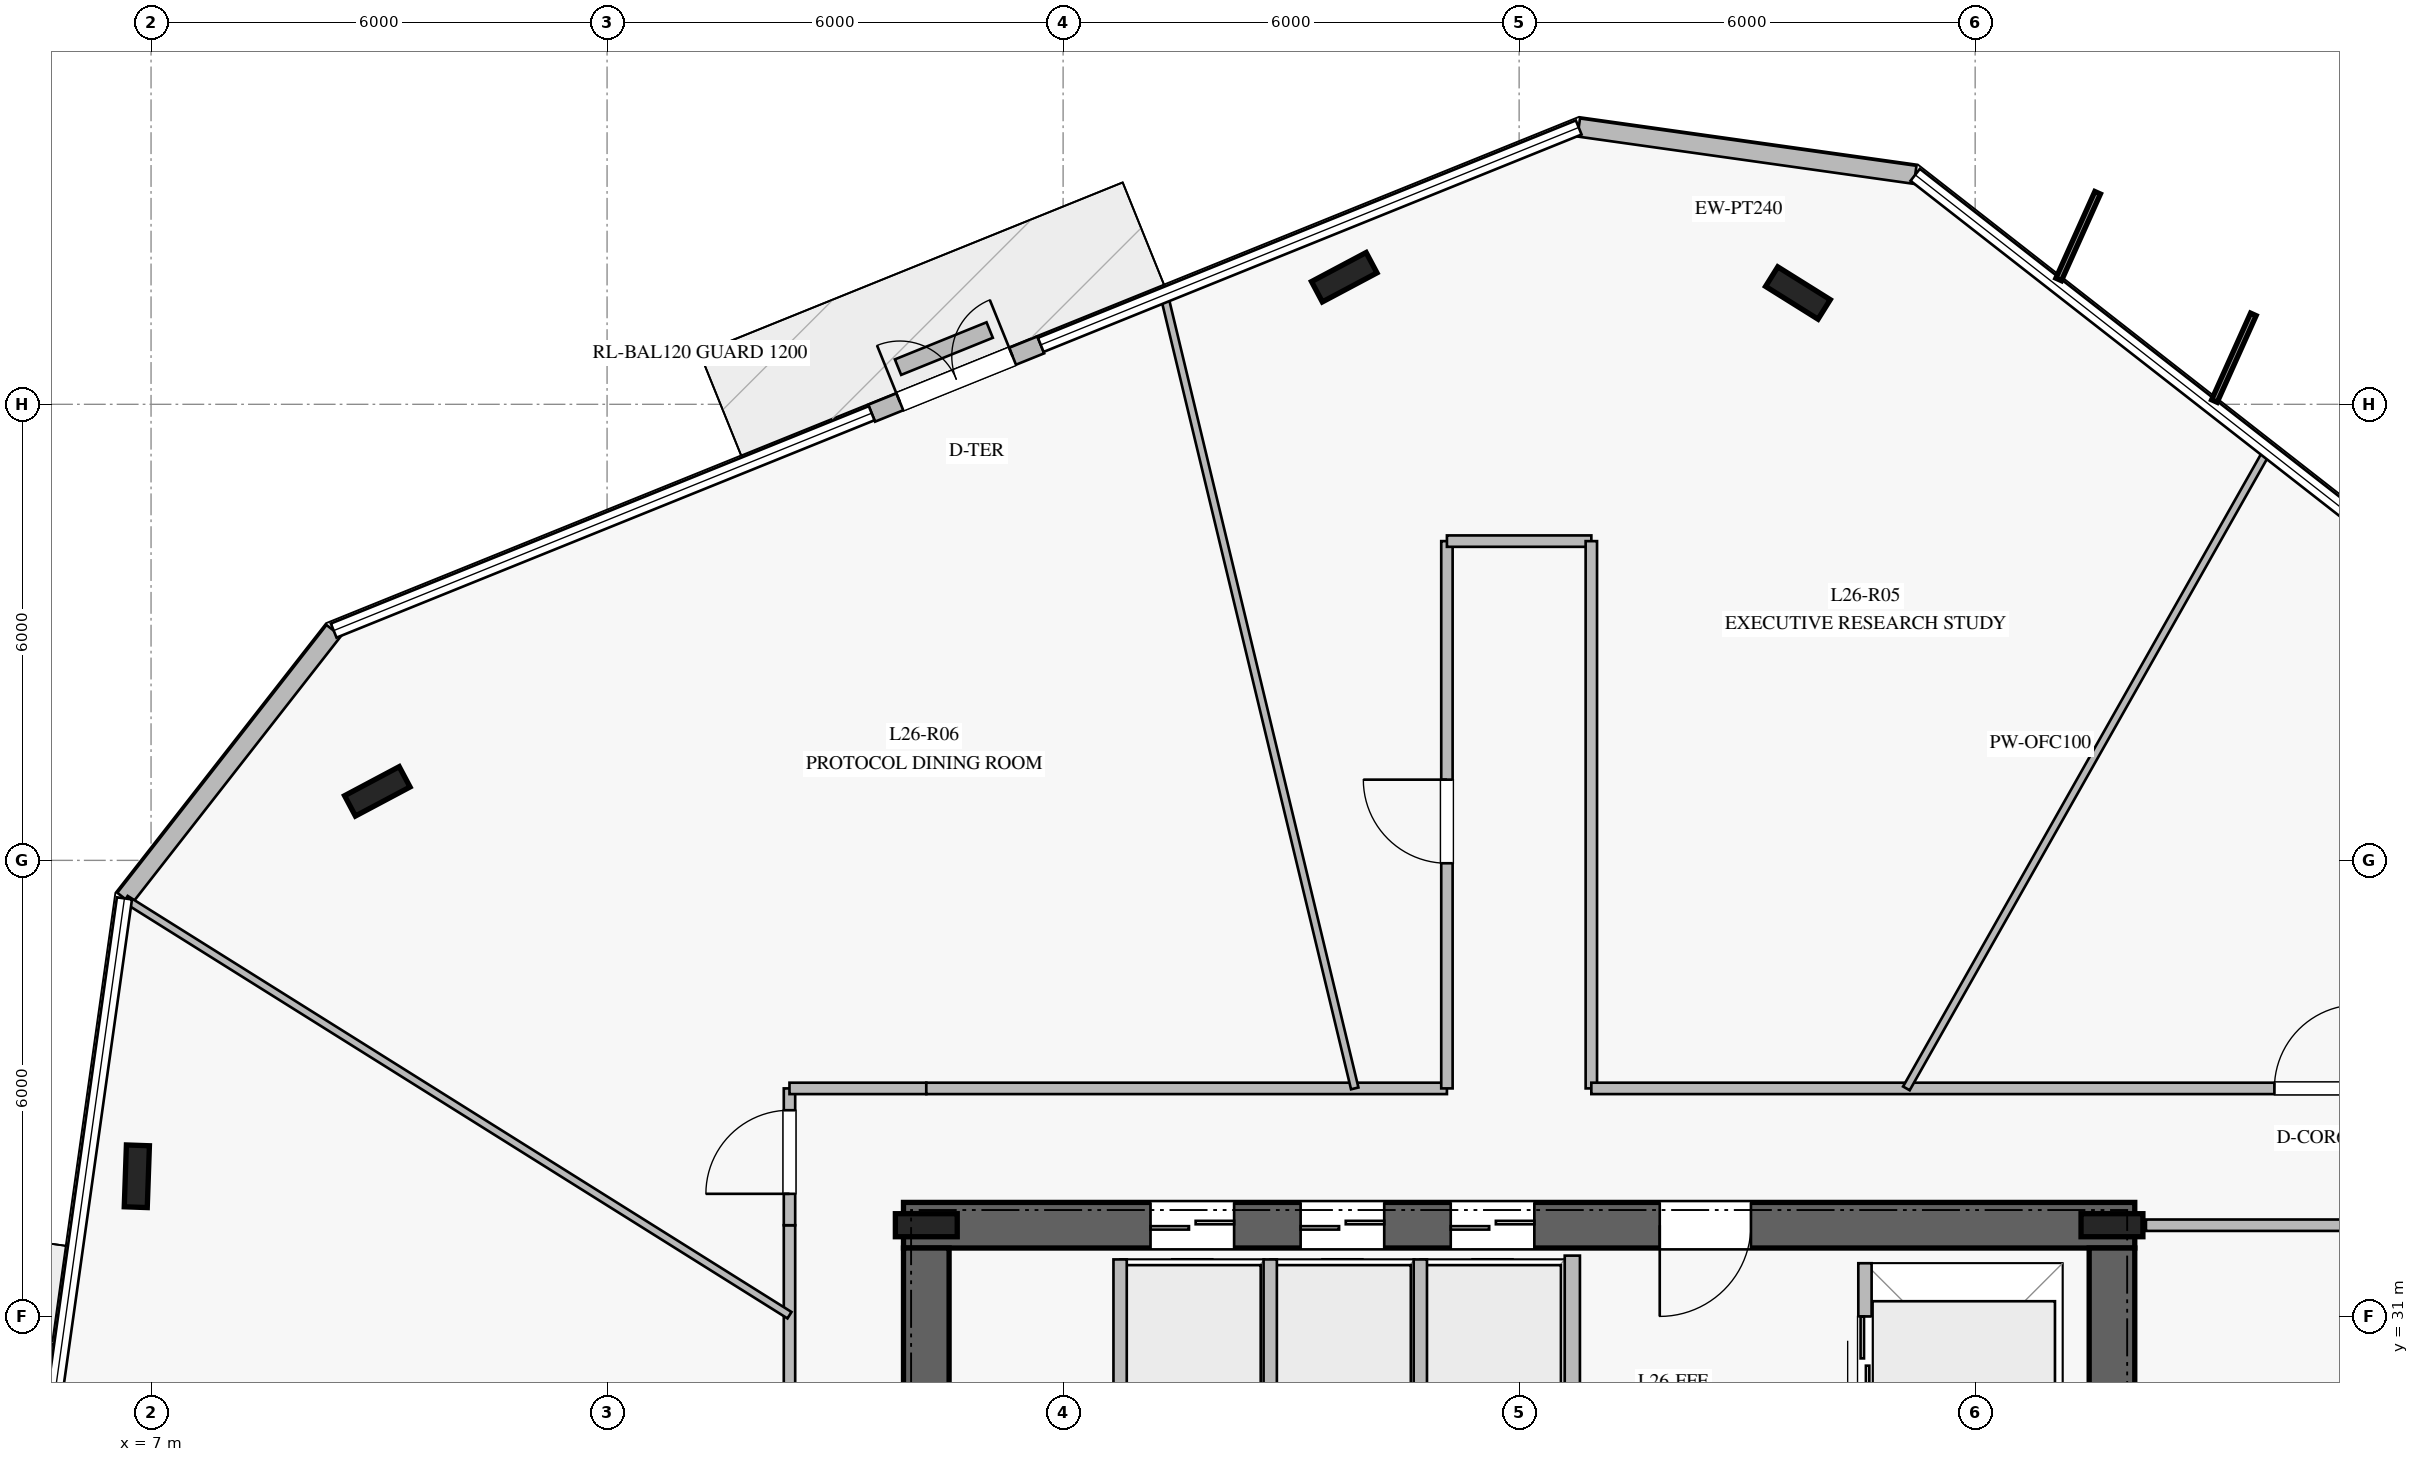
"""IFC4 building model, lengths in metres.
Left out: names, types, materials, properties, quantities, classifications, styles, units other than length and angle.
Written with IfcOpenShell. Run it as: python <this file> out.ifc"""

import sys

from ifc_helpers import new_model, si_unit, direction, frame, frame_2d, origin, origin_2d, place, context, subcontext, project, spatial, rectangle, i_section, extrude, element, fill, save


model = new_model("IFC4")
c1 = context("Model", 3, precision=1e-05, world=origin(), true_north=direction((0.0, 1.0)))
c2 = subcontext(c1, "Body", "Model", "MODEL_VIEW")
j1 = project(units=[si_unit("LENGTHUNIT", "METRE"), si_unit("PLANEANGLEUNIT", "RADIAN")], contexts=[c1])
p1 = place(None, origin())
s1 = spatial("IfcSite", under=j1, at=p1, CompositionType="ELEMENT")
p2 = place(p1, origin())
s2 = spatial("IfcBuilding", under=s1, at=p2, CompositionType="ELEMENT")
p3 = place(p2, frame((0.0, 0.0, 110.4)))
s3 = spatial("IfcBuildingStorey", under=s2, at=p3, CompositionType="ELEMENT", Elevation=110.4)
p4 = place(p3, frame((33.1, 32.2, 0.0), z_axis=(0.0, 0.0, 1.0), x_axis=(-1.0, 0.0, 0.0)))
e1 = element("IfcWall", 1, at=p4, inside=s3, PredefinedType="SHEAR", context=c2, shape_type="SweptSolid", body=[
    extrude(rectangle(XDim=16.2, YDim=0.6, at=frame_2d((8.1, 0.0))), origin(), (0.0, 0.0, 1.0), 3.76),
])
p5 = place(p4, frame((5.05, 0.0, 0.0)))
e2 = element("IfcOpeningElement", 2, at=p5, cuts=e1, PredefinedType="OPENING", context=c2, shape_type="SweptSolid", body=[
    extrude(rectangle(XDim=1.2, YDim=2.25, at=frame_2d((0.6, 1.125))), frame((0.0, 0.31, 0.0), z_axis=(0.0, -1.0, 0.0), x_axis=(1.0, 0.0, 0.0)), (0.0, 0.0, 1.0), 0.62),
])
p6 = place(p4, frame((11.85, 0.0, 0.0)))
e3 = element("IfcOpeningElement", 3, at=p6, cuts=e1, PredefinedType="OPENING", context=c2, shape_type="SweptSolid", body=[
    extrude(rectangle(XDim=1.1, YDim=2.2, at=frame_2d((0.55, 1.1))), frame((0.0, 0.31, 0.0), z_axis=(0.0, -1.0, 0.0), x_axis=(1.0, 0.0, 0.0)), (0.0, 0.0, 1.0), 0.62),
])
p7 = place(p4, frame((9.875, 0.0, 0.0)))
e4 = element("IfcOpeningElement", 4, at=p7, cuts=e1, PredefinedType="OPENING", context=c2, shape_type="SweptSolid", body=[
    extrude(rectangle(XDim=1.1, YDim=2.2, at=frame_2d((0.55, 1.1))), frame((0.0, 0.31, 0.0), z_axis=(0.0, -1.0, 0.0), x_axis=(1.0, 0.0, 0.0)), (0.0, 0.0, 1.0), 0.62),
])
p8 = place(p4, frame((7.9, 0.0, 0.0)))
e5 = element("IfcOpeningElement", 5, at=p8, cuts=e1, PredefinedType="OPENING", context=c2, shape_type="SweptSolid", body=[
    extrude(rectangle(XDim=1.1, YDim=2.2, at=frame_2d((0.55, 1.1))), frame((0.0, 0.31, 0.0), z_axis=(0.0, -1.0, 0.0), x_axis=(1.0, 0.0, 0.0)), (0.0, 0.0, 1.0), 0.62),
])
p9 = place(p3, frame((17.2, 31.9, 0.0), z_axis=(0.0, 0.0, 1.0), x_axis=(0.0, -1.0, 0.0)))
e6 = element("IfcWall", 6, at=p9, inside=s3, PredefinedType="SHEAR", context=c2, shape_type="SweptSolid", body=[
    extrude(rectangle(XDim=13.8, YDim=0.6, at=frame_2d((6.9, 0.0))), origin(), (0.0, 0.0, 1.0), 3.76),
])
p10 = place(p9, frame((2.05, 0.0, 0.0)))
e7 = element("IfcOpeningElement", 7, at=p10, cuts=e6, PredefinedType="OPENING", context=c2, shape_type="SweptSolid", body=[
    extrude(rectangle(XDim=1.5, YDim=2.2, at=frame_2d((0.75, 1.1))), frame((0.0, 0.31, 0.0), z_axis=(0.0, -1.0, 0.0), x_axis=(1.0, 0.0, 0.0)), (0.0, 0.0, 1.0), 0.62),
])
p11 = place(p3, frame((32.8, 18.1, 0.0), z_axis=(0.0, 0.0, 1.0), x_axis=(0.0, 1.0, 0.0)))
e8 = element("IfcWall", 8, at=p11, inside=s3, PredefinedType="SHEAR", context=c2, shape_type="SweptSolid", body=[
    extrude(rectangle(XDim=13.8, YDim=0.6, at=frame_2d((6.9, 0.0))), origin(), (0.0, 0.0, 1.0), 3.76),
])
for number, where, z_axis, x_axis in (
    (9, (32.8, 32.2, 0.0), (0.0, 0.0, 1.0), (1.0, 0.0, 0.0)),
    (10, (17.2, 32.2, 0.0), (0.0, 0.0, 1.0), (1.0, 0.0, 0.0)),
    (11, (28.668, 44.464, 0.0), (0.0, 0.0, 1.0), (-0.848, 0.53, 0.0)),
    (12, (22.699, 44.672, 0.0), (0.0, 0.0, 1.0), (0.883, 0.469, 0.0)),
    (13, (9.977, 37.908, 0.0), (0.0, 0.0, 1.0), (0.883, 0.469, 0.0)),
    (14, (6.813, 32.844, 0.0), (0.0, 0.0, 1.0), (0.035, 0.999, 0.0)),
):
    element("IfcColumn", number, at=place(p3, frame(where, z_axis=z_axis, x_axis=x_axis)), inside=s3, PredefinedType="COLUMN", context=c2, shape_type="SweptSolid", body=[
        extrude(i_section(OverallWidth=0.303, OverallDepth=0.814, WebThickness=0.021, FlangeThickness=0.04, at=origin_2d()), origin(), (0.0, 0.0, 1.0), 4.0),
    ])
p12 = place(p3, frame((30.211, 46.019, 0.0), z_axis=(0.0, 0.0, 1.0), x_axis=(-0.990241158584, 0.139364442547, 0.0)))
e15 = element("IfcWall", 15, at=p12, inside=s3, PredefinedType="STANDARD", context=c2, shape_type="SweptSolid", body=[
    extrude(rectangle(XDim=4.471, YDim=0.24, at=frame_2d((2.235, 0.0))), origin(), (0.0, 0.0, 1.0), 3.76),
])
p13 = place(p3, frame((18.706, 43.782, 0.0), z_axis=(0.0, 0.0, 1.0), x_axis=(-0.927194278769, -0.374580791576, 0.0)))
e16 = element("IfcWall", 16, at=p13, inside=s3, PredefinedType="STANDARD", context=c2, shape_type="SweptSolid", body=[
    extrude(rectangle(XDim=2.4, YDim=0.24, at=frame_2d((1.2, 0.0))), origin(), (0.0, 0.0, 1.0), 3.76),
])
p14 = place(p13, frame((0.4, 0.0, 0.0)))
e17 = element("IfcOpeningElement", 17, at=p14, cuts=e16, PredefinedType="OPENING", context=c2, shape_type="SweptSolid", body=[
    extrude(rectangle(XDim=1.6, YDim=2.25, at=frame_2d((0.8, 1.125))), frame((0.0, 0.13, 0.0), z_axis=(0.0, -1.0, 0.0), x_axis=(1.0, 0.0, 0.0)), (0.0, 0.0, 1.0), 0.26),
])
p15 = place(p3, frame((9.403, 40.023, 0.0), z_axis=(0.0, 0.0, 1.0), x_axis=(-0.615764831552, -0.787929991956, 0.0)))
e18 = element("IfcWall", 18, at=p15, inside=s3, PredefinedType="STANDARD", context=c2, shape_type="SweptSolid", body=[
    extrude(rectangle(XDim=4.471, YDim=0.24, at=frame_2d((2.236, 0.0))), origin(), (0.0, 0.0, 1.0), 3.76),
])
p16 = place(p3, frame((18.034, 43.977, 0.0), z_axis=(0.0, 0.0, 1.0), x_axis=(-0.926980993663, -0.375108300877, 0.0)))
e19 = element("IfcWall", 19, at=p16, inside=s3, PredefinedType="USERDEFINED", context=c2, shape_type="SweptSolid", body=[
    extrude(rectangle(XDim=1.301, YDim=0.22, at=frame_2d((0.65, 0.0))), origin(), (0.0, 0.0, 1.0), 0.4),
])
p17 = place(p3, frame((25.7, 26.65, 0.0), z_axis=(0.0, 0.0, 1.0), x_axis=(0.0, 1.0, 0.0)))
e20 = element("IfcWall", 20, at=p17, inside=s3, PredefinedType="PARTITIONING", context=c2, shape_type="SweptSolid", body=[
    extrude(rectangle(XDim=5.15, YDim=0.2, at=frame_2d((2.575, 0.0))), origin(), (0.0, 0.0, 1.0), 3.76),
])
for number, where, z_axis, x_axis in (
    (21, (19.75, 29.4, 0.0), (0.0, 0.0, 1.0), (0.0, 1.0, 0.0)),
    (22, (21.725, 29.4, 0.0), (0.0, 0.0, 1.0), (0.0, 1.0, 0.0)),
    (23, (23.7, 29.4, 0.0), (0.0, 0.0, 1.0), (0.0, 1.0, 0.0)),
):
    element("IfcWall", number, at=place(p3, frame(where, z_axis=z_axis, x_axis=x_axis)), inside=s3, PredefinedType="PARTITIONING", context=c2, shape_type="SweptSolid", body=[
        extrude(rectangle(XDim=2.35, YDim=0.175, at=frame_2d((1.175, 0.0))), origin(), (0.0, 0.0, 1.0), 3.76),
    ])
p18 = place(p3, frame((29.55, 29.1, 0.0), z_axis=(0.0, 0.0, 1.0), x_axis=(0.0, 1.0, 0.0)))
e24 = element("IfcWall", 24, at=p18, inside=s3, PredefinedType="PARTITIONING", context=c2, shape_type="SweptSolid", body=[
    extrude(rectangle(XDim=2.6, YDim=0.175, at=frame_2d((1.3, 0.0))), origin(), (0.0, 0.0, 1.0), 3.76),
])
p19 = place(p18, frame((0.7, 0.0, 0.0)))
e25 = element("IfcOpeningElement", 25, at=p19, cuts=e24, PredefinedType="OPENING", context=c2, shape_type="SweptSolid", body=[
    extrude(rectangle(XDim=1.2, YDim=2.2, at=frame_2d((0.6, 1.1))), frame((0.0, 0.098, 0.0), z_axis=(0.0, -1.0, 0.0), x_axis=(1.0, 0.0, 0.0)), (0.0, 0.0, 1.0), 0.195),
])
p20 = place(p3, frame((15.4, 25.95, 0.0), z_axis=(0.0, 0.0, 1.0), x_axis=(0.0, 1.0, 0.0)))
e26 = element("IfcWall", 26, at=p20, inside=s3, PredefinedType="PARTITIONING", context=c2, shape_type="SweptSolid", body=[
    extrude(rectangle(XDim=6.25, YDim=0.15, at=frame_2d((3.125, 0.0))), origin(), (0.0, 0.0, 1.0), 3.21),
])
p21 = place(p3, frame((15.4, 32.2, 0.0), z_axis=(0.0, 0.0, 1.0), x_axis=(0.0, 1.0, 0.0)))
e27 = element("IfcWall", 27, at=p21, inside=s3, PredefinedType="PARTITIONING", context=c2, shape_type="SweptSolid", body=[
    extrude(rectangle(XDim=1.8, YDim=0.15, at=frame_2d((0.9, 0.0))), origin(), (0.0, 0.0, 1.0), 3.21),
])
p22 = place(p21, frame((0.413, 0.0, 0.0)))
e28 = element("IfcOpeningElement", 28, at=p22, cuts=e27, PredefinedType="OPENING", context=c2, shape_type="SweptSolid", body=[
    extrude(rectangle(XDim=1.1, YDim=2.2, at=frame_2d((0.55, 1.1))), frame((0.0, 0.085, 0.0), z_axis=(0.0, -1.0, 0.0), x_axis=(1.0, 0.0, 0.0)), (0.0, 0.0, 1.0), 0.17),
])
p23 = place(p3, frame((15.4, 34.0, 0.0), z_axis=(0.0, 0.0, 1.0), x_axis=(1.0, 0.0, 0.0)))
e29 = element("IfcWall", 29, at=p23, inside=s3, PredefinedType="PARTITIONING", context=c2, shape_type="SweptSolid", body=[
    extrude(rectangle(XDim=1.8, YDim=0.15, at=frame_2d((0.9, 0.0))), origin(), (0.0, 0.0, 1.0), 3.76),
])
p24 = place(p3, frame((17.2, 34.0, 0.0), z_axis=(0.0, 0.0, 1.0), x_axis=(1.0, 0.0, 0.0)))
e30 = element("IfcWall", 30, at=p24, inside=s3, PredefinedType="PARTITIONING", context=c2, shape_type="SweptSolid", body=[
    extrude(rectangle(XDim=6.85, YDim=0.15, at=frame_2d((3.425, 0.0))), origin(), (0.0, 0.0, 1.0), 3.21),
])
p25 = place(p3, frame((24.05, 34.0, 0.0), z_axis=(0.0, 0.0, 1.0), x_axis=(0.0, 1.0, 0.0)))
e31 = element("IfcWall", 31, at=p25, inside=s3, PredefinedType="PARTITIONING", context=c2, shape_type="SweptSolid", body=[
    extrude(rectangle(XDim=7.2, YDim=0.15, at=frame_2d((3.6, 0.0))), origin(), (0.0, 0.0, 1.0), 3.36),
])
p26 = place(p25, frame((2.962, 0.0, 0.0)))
e32 = element("IfcOpeningElement", 32, at=p26, cuts=e31, PredefinedType="OPENING", context=c2, shape_type="SweptSolid", body=[
    extrude(rectangle(XDim=1.1, YDim=2.2, at=frame_2d((0.55, 1.1))), frame((0.0, 0.085, 0.0), z_axis=(0.0, -1.0, 0.0), x_axis=(1.0, 0.0, 0.0)), (0.0, 0.0, 1.0), 0.17),
])
p27 = place(p3, frame((24.05, 41.2, 0.0), z_axis=(0.0, 0.0, 1.0), x_axis=(1.0, 0.0, 0.0)))
e33 = element("IfcWall", 33, at=p27, inside=s3, PredefinedType="PARTITIONING", context=c2, shape_type="SweptSolid", body=[
    extrude(rectangle(XDim=1.9, YDim=0.15, at=frame_2d((0.95, 0.0))), origin(), (0.0, 0.0, 1.0), 3.76),
])
p28 = place(p3, frame((25.95, 41.2, 0.0), z_axis=(0.0, 0.0, 1.0), x_axis=(0.0, -1.0, 0.0)))
e34 = element("IfcWall", 34, at=p28, inside=s3, PredefinedType="PARTITIONING", context=c2, shape_type="SweptSolid", body=[
    extrude(rectangle(XDim=7.2, YDim=0.15, at=frame_2d((3.6, 0.0))), origin(), (0.0, 0.0, 1.0), 3.36),
])
p29 = place(p3, frame((25.95, 34.0, 0.0), z_axis=(0.0, 0.0, 1.0), x_axis=(1.0, 0.0, 0.0)))
e35 = element("IfcWall", 35, at=p29, inside=s3, PredefinedType="PARTITIONING", context=c2, shape_type="SweptSolid", body=[
    extrude(rectangle(XDim=15.25, YDim=0.15, at=frame_2d((7.625, 0.0))), origin(), (0.0, 0.0, 1.0), 3.21),
])
p30 = place(p29, frame((8.987, 0.0, 0.0)))
e36 = element("IfcOpeningElement", 36, at=p30, cuts=e35, PredefinedType="OPENING", context=c2, shape_type="SweptSolid", body=[
    extrude(rectangle(XDim=1.1, YDim=2.2, at=frame_2d((0.55, 1.1))), frame((0.0, 0.085, 0.0), z_axis=(0.0, -1.0, 0.0), x_axis=(1.0, 0.0, 0.0)), (0.0, 0.0, 1.0), 0.17),
])
p31 = place(p3, frame((41.2, 32.2, 0.0), z_axis=(0.0, 0.0, 1.0), x_axis=(-1.0, 0.0, 0.0)))
e37 = element("IfcWall", 37, at=p31, inside=s3, PredefinedType="PARTITIONING", context=c2, shape_type="SweptSolid", body=[
    extrude(rectangle(XDim=7.953, YDim=0.15, at=frame_2d((3.977, 0.0))), origin(), (0.0, 0.0, 1.0), 3.21),
])
p32 = place(p3, frame((30.095, 34.0, 0.0), z_axis=(0.0, 0.0, 1.0), x_axis=(0.492564171428, 0.870276126885, 0.0)))
e38 = element("IfcWall", 38, at=p32, inside=s3, PredefinedType="MOVABLE", context=c2, shape_type="SweptSolid", body=[
    extrude(rectangle(XDim=9.632, YDim=0.1, at=frame_2d((4.816, 0.0))), origin(), (0.0, 0.0, 1.0), 3.16),
])
p33 = place(p3, frame((22.837, 34.0, 0.0), z_axis=(0.0, 0.0, 1.0), x_axis=(-0.233627966114, 0.97232606334, 0.0)))
e39 = element("IfcWall", 39, at=p33, inside=s3, PredefinedType="MOVABLE", context=c2, shape_type="SweptSolid", body=[
    extrude(rectangle(XDim=10.718, YDim=0.1, at=frame_2d((5.359, 0.0))), origin(), (0.0, 0.0, 1.0), 3.16),
])
p34 = place(p3, frame((15.4, 31.016, 0.0), z_axis=(0.0, 0.0, 1.0), x_axis=(-0.847334971685, 0.531058796896, 0.0)))
e40 = element("IfcWall", 40, at=p34, inside=s3, PredefinedType="MOVABLE", context=c2, shape_type="SweptSolid", body=[
    extrude(rectangle(XDim=10.307, YDim=0.1, at=frame_2d((5.154, 0.0))), origin(), (0.0, 0.0, 1.0), 3.16),
])
p35 = place(p14, frame((1.6, 0.0, 0.0), z_axis=(0.0, 0.0, 1.0), x_axis=(-1.0, 0.0, 0.0)))
e41 = element("IfcDoor", 41, at=p35, inside=s3, OperationType="DOUBLE_DOOR_SINGLE_SWING", PredefinedType="DOOR", context=c2, shape_type="SweptSolid", body=[
    extrude(rectangle(XDim=1.6, YDim=2.25, at=frame_2d((0.8, 1.125))), frame((0.0, 0.025, 0.0), z_axis=(0.0, -1.0, 0.0), x_axis=(1.0, 0.0, 0.0)), (0.0, 0.0, 1.0), 0.05),
])
fill(e17, e41)
p36 = place(p5, origin())
e42 = element("IfcDoor", 42, at=p36, inside=s3, OperationType="SINGLE_SWING_RIGHT", PredefinedType="DOOR", context=c2, shape_type="SweptSolid", body=[
    extrude(rectangle(XDim=1.2, YDim=2.25, at=frame_2d((0.6, 1.125))), frame((0.0, 0.025, 0.0), z_axis=(0.0, -1.0, 0.0), x_axis=(1.0, 0.0, 0.0)), (0.0, 0.0, 1.0), 0.05),
])
fill(e2, e42)
p37 = place(p6, origin())
e43 = element("IfcDoor", 43, at=p37, inside=s3, OperationType="DOUBLE_DOOR_SLIDING", PredefinedType="DOOR", context=c2, shape_type="SweptSolid", body=[
    extrude(rectangle(XDim=1.1, YDim=2.2, at=frame_2d((0.55, 1.1))), frame((0.0, 0.025, 0.0), z_axis=(0.0, -1.0, 0.0), x_axis=(1.0, 0.0, 0.0)), (0.0, 0.0, 1.0), 0.05),
])
fill(e3, e43)
p38 = place(p7, origin())
e44 = element("IfcDoor", 44, at=p38, inside=s3, OperationType="DOUBLE_DOOR_SLIDING", PredefinedType="DOOR", context=c2, shape_type="SweptSolid", body=[
    extrude(rectangle(XDim=1.1, YDim=2.2, at=frame_2d((0.55, 1.1))), frame((0.0, 0.025, 0.0), z_axis=(0.0, -1.0, 0.0), x_axis=(1.0, 0.0, 0.0)), (0.0, 0.0, 1.0), 0.05),
])
fill(e4, e44)
p39 = place(p8, origin())
e45 = element("IfcDoor", 45, at=p39, inside=s3, OperationType="DOUBLE_DOOR_SLIDING", PredefinedType="DOOR", context=c2, shape_type="SweptSolid", body=[
    extrude(rectangle(XDim=1.1, YDim=2.2, at=frame_2d((0.55, 1.1))), frame((0.0, 0.025, 0.0), z_axis=(0.0, -1.0, 0.0), x_axis=(1.0, 0.0, 0.0)), (0.0, 0.0, 1.0), 0.05),
])
fill(e5, e45)
p40 = place(p19, origin())
e46 = element("IfcDoor", 46, at=p40, inside=s3, OperationType="DOUBLE_DOOR_SLIDING", PredefinedType="DOOR", context=c2, shape_type="SweptSolid", body=[
    extrude(rectangle(XDim=1.2, YDim=2.2, at=frame_2d((0.6, 1.1))), frame((0.0, 0.025, 0.0), z_axis=(0.0, -1.0, 0.0), x_axis=(1.0, 0.0, 0.0)), (0.0, 0.0, 1.0), 0.05),
])
fill(e25, e46)
p41 = place(p30, origin())
e47 = element("IfcDoor", 47, at=p41, inside=s3, OperationType="SINGLE_SWING_RIGHT", PredefinedType="DOOR", context=c2, shape_type="SweptSolid", body=[
    extrude(rectangle(XDim=1.1, YDim=2.2, at=frame_2d((0.55, 1.1))), frame((0.0, 0.025, 0.0), z_axis=(0.0, -1.0, 0.0), x_axis=(1.0, 0.0, 0.0)), (0.0, 0.0, 1.0), 0.05),
])
fill(e36, e47)
p42 = place(p26, origin())
e48 = element("IfcDoor", 48, at=p42, inside=s3, OperationType="SINGLE_SWING_RIGHT", PredefinedType="DOOR", context=c2, shape_type="SweptSolid", body=[
    extrude(rectangle(XDim=1.1, YDim=2.2, at=frame_2d((0.55, 1.1))), frame((0.0, 0.025, 0.0), z_axis=(0.0, -1.0, 0.0), x_axis=(1.0, 0.0, 0.0)), (0.0, 0.0, 1.0), 0.05),
])
fill(e32, e48)
p43 = place(p22, origin())
e49 = element("IfcDoor", 49, at=p43, inside=s3, OperationType="SINGLE_SWING_LEFT", PredefinedType="DOOR", context=c2, shape_type="SweptSolid", body=[
    extrude(rectangle(XDim=1.1, YDim=2.2, at=frame_2d((0.55, 1.1))), frame((0.0, 0.025, 0.0), z_axis=(0.0, -1.0, 0.0), x_axis=(1.0, 0.0, 0.0)), (0.0, 0.0, 1.0), 0.05),
])
fill(e28, e49)
save(model, sys.argv[1])
